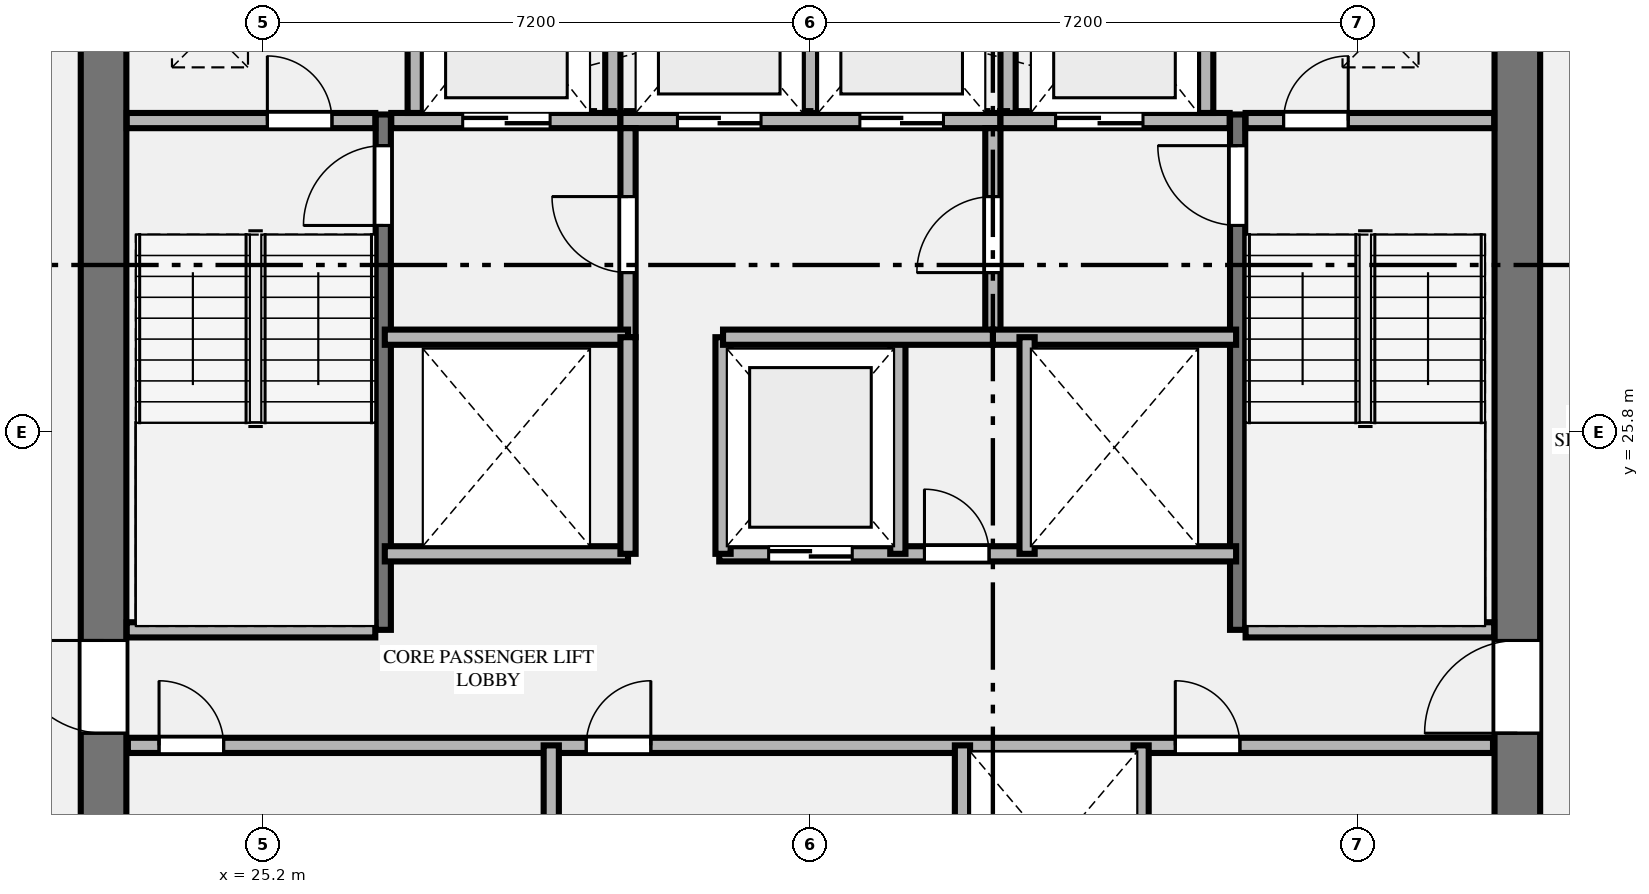
"""IFC4 building model, lengths in metres.
Left out: names, types, materials, properties, quantities, classifications, styles, units other than length and angle.
Written with IfcOpenShell. Run it as: python <this file> out.ifc"""

import sys

from ifc_helpers import new_model, si_unit, direction, frame, frame_2d, origin, place, context, subcontext, project, spatial, rectangle, extrude, element, fill, save


model = new_model("IFC4")
c1 = context("Model", 3, precision=1e-05, world=origin(), true_north=direction((0.0, 1.0)))
c2 = subcontext(c1, "Body", "Model", "MODEL_VIEW")
j1 = project(units=[si_unit("LENGTHUNIT", "METRE"), si_unit("PLANEANGLEUNIT", "RADIAN")], contexts=[c1])
p1 = place(None, origin())
s1 = spatial("IfcSite", under=j1, at=p1, CompositionType="ELEMENT")
p2 = place(p1, origin())
s2 = spatial("IfcBuilding", under=s1, at=p2, CompositionType="ELEMENT")
p3 = place(p2, frame((0.0, 0.0, 171.9)))
s3 = spatial("IfcBuildingStorey", under=s2, at=p3, CompositionType="ELEMENT", Elevation=171.9)
p4 = place(p3, frame((23.1, 18.925, 0.0), z_axis=(0.0, 0.0, 1.0), x_axis=(0.0, 1.0, 0.0)))
e1 = element("IfcWall", 1, at=p4, inside=s3, PredefinedType="SHEAR", context=c2, shape_type="SweptSolid", body=[
    extrude(rectangle(XDim=13.95, YDim=0.6, at=frame_2d((6.975, 0.0))), origin(), (0.0, 0.0, 1.0), 3.35),
])
p5 = place(p4, frame((2.915, 0.0, 0.0)))
e2 = element("IfcOpeningElement", 2, at=p5, cuts=e1, PredefinedType="OPENING", context=c2, shape_type="SweptSolid", body=[
    extrude(rectangle(XDim=1.22, YDim=2.25, at=frame_2d((0.61, 1.125))), frame((0.0, 0.31, 0.0), z_axis=(0.0, -1.0, 0.0), x_axis=(1.0, 0.0, 0.0)), (0.0, 0.0, 1.0), 0.62),
])
p6 = place(p3, frame((41.7, 18.925, 0.0), z_axis=(0.0, 0.0, 1.0), x_axis=(0.0, 1.0, 0.0)))
e3 = element("IfcWall", 3, at=p6, inside=s3, PredefinedType="SHEAR", context=c2, shape_type="SweptSolid", body=[
    extrude(rectangle(XDim=13.95, YDim=0.6, at=frame_2d((6.975, 0.0))), origin(), (0.0, 0.0, 1.0), 3.35),
])
p7 = place(p6, frame((2.915, 0.0, 0.0)))
e4 = element("IfcOpeningElement", 4, at=p7, cuts=e3, PredefinedType="OPENING", context=c2, shape_type="SweptSolid", body=[
    extrude(rectangle(XDim=1.22, YDim=2.25, at=frame_2d((0.61, 1.125))), frame((0.0, 0.31, 0.0), z_axis=(0.0, -1.0, 0.0), x_axis=(1.0, 0.0, 0.0)), (0.0, 0.0, 1.0), 0.62),
])
p8 = place(p3, frame((26.78, 23.2, 0.0), z_axis=(0.0, 0.0, 1.0), x_axis=(0.0, 1.0, 0.0)))
e5 = element("IfcWall", 5, at=p8, inside=s3, PredefinedType="SHEAR", context=c2, shape_type="SweptSolid", body=[
    extrude(rectangle(XDim=6.78, YDim=0.2, at=frame_2d((3.39, 0.0))), origin(), (0.0, 0.0, 1.0), 3.55),
])
p9 = place(p8, frame((5.32, 0.0, 0.0)))
e6 = element("IfcOpeningElement", 6, at=p9, cuts=e5, PredefinedType="OPENING", context=c2, shape_type="SweptSolid", body=[
    extrude(rectangle(XDim=1.05, YDim=2.15, at=frame_2d((0.525, 1.075))), frame((0.0, 0.11, 0.0), z_axis=(0.0, -1.0, 0.0), x_axis=(1.0, 0.0, 0.0)), (0.0, 0.0, 1.0), 0.22),
])
p10 = place(p3, frame((23.405, 23.2, 0.0), z_axis=(0.0, 0.0, 1.0), x_axis=(1.0, 0.0, 0.0)))
e7 = element("IfcWall", 7, at=p10, inside=s3, PredefinedType="PLUMBINGWALL", context=c2, shape_type="SweptSolid", body=[
    extrude(rectangle(XDim=3.27, YDim=0.2, at=frame_2d((1.635, 0.0))), origin(), (0.0, 0.0, 1.0), 3.35),
])
p11 = place(p3, frame((38.02, 23.2, 0.0), z_axis=(0.0, 0.0, 1.0), x_axis=(0.0, 1.0, 0.0)))
e8 = element("IfcWall", 8, at=p11, inside=s3, PredefinedType="SHEAR", context=c2, shape_type="SweptSolid", body=[
    extrude(rectangle(XDim=6.78, YDim=0.2, at=frame_2d((3.39, 0.0))), origin(), (0.0, 0.0, 1.0), 3.55),
])
p12 = place(p11, frame((5.32, 0.0, 0.0)))
e9 = element("IfcOpeningElement", 9, at=p12, cuts=e8, PredefinedType="OPENING", context=c2, shape_type="SweptSolid", body=[
    extrude(rectangle(XDim=1.05, YDim=2.15, at=frame_2d((0.525, 1.075))), frame((0.0, 0.11, 0.0), z_axis=(0.0, -1.0, 0.0), x_axis=(1.0, 0.0, 0.0)), (0.0, 0.0, 1.0), 0.22),
])
p13 = place(p3, frame((38.125, 23.2, 0.0), z_axis=(0.0, 0.0, 1.0), x_axis=(1.0, 0.0, 0.0)))
e10 = element("IfcWall", 10, at=p13, inside=s3, PredefinedType="PLUMBINGWALL", context=c2, shape_type="SweptSolid", body=[
    extrude(rectangle(XDim=3.27, YDim=0.2, at=frame_2d((1.635, 0.0))), origin(), (0.0, 0.0, 1.0), 3.35),
])
p14 = place(p3, frame((23.405, 29.9, 0.0), z_axis=(0.0, 0.0, 1.0), x_axis=(1.0, 0.0, 0.0)))
e11 = element("IfcWall", 11, at=p14, inside=s3, PredefinedType="PLUMBINGWALL", context=c2, shape_type="SweptSolid", body=[
    extrude(rectangle(XDim=3.27, YDim=0.2, at=frame_2d((1.635, 0.0))), origin(), (0.0, 0.0, 1.0), 3.35),
])
p15 = place(p14, frame((1.85, 0.0, 0.0)))
e12 = element("IfcOpeningElement", 12, at=p15, cuts=e11, PredefinedType="OPENING", context=c2, shape_type="SweptSolid", body=[
    extrude(rectangle(XDim=0.85, YDim=2.05, at=frame_2d((0.425, 1.025))), frame((0.0, 0.11, 0.0), z_axis=(0.0, -1.0, 0.0), x_axis=(1.0, 0.0, 0.0)), (0.0, 0.0, 1.0), 0.22),
])
p16 = place(p3, frame((26.885, 29.9, 0.0), z_axis=(0.0, 0.0, 1.0), x_axis=(1.0, 0.0, 0.0)))
e13 = element("IfcWall", 13, at=p16, inside=s3, PredefinedType="PLUMBINGWALL", context=c2, shape_type="SweptSolid", body=[
    extrude(rectangle(XDim=3.015, YDim=0.2, at=frame_2d((1.507, 0.0))), origin(), (0.0, 0.0, 1.0), 3.35),
])
p17 = place(p16, frame((0.94, 0.0, 0.0)))
e14 = element("IfcOpeningElement", 14, at=p17, cuts=e13, PredefinedType="OPENING", context=c2, shape_type="SweptSolid", body=[
    extrude(rectangle(XDim=1.15, YDim=2.2, at=frame_2d((0.575, 1.1))), frame((0.0, 0.11, 0.0), z_axis=(0.0, -1.0, 0.0), x_axis=(1.0, 0.0, 0.0)), (0.0, 0.0, 1.0), 0.22),
])
p18 = place(p3, frame((29.9, 29.9, 0.0), z_axis=(0.0, 0.0, 1.0), x_axis=(1.0, 0.0, 0.0)))
e15 = element("IfcWall", 15, at=p18, inside=s3, PredefinedType="PLUMBINGWALL", context=c2, shape_type="SweptSolid", body=[
    extrude(rectangle(XDim=5.0, YDim=0.2, at=frame_2d((2.5, 0.0))), origin(), (0.0, 0.0, 1.0), 3.35),
])
p19 = place(p18, frame((0.75, 0.0, 0.0)))
e16 = element("IfcOpeningElement", 16, at=p19, cuts=e15, PredefinedType="OPENING", context=c2, shape_type="SweptSolid", body=[
    extrude(rectangle(XDim=1.1, YDim=2.2, at=frame_2d((0.55, 1.1))), frame((0.0, 0.11, 0.0), z_axis=(0.0, -1.0, 0.0), x_axis=(1.0, 0.0, 0.0)), (0.0, 0.0, 1.0), 0.22),
])
p20 = place(p18, frame((3.15, 0.0, 0.0)))
e17 = element("IfcOpeningElement", 17, at=p20, cuts=e15, PredefinedType="OPENING", context=c2, shape_type="SweptSolid", body=[
    extrude(rectangle(XDim=1.1, YDim=2.2, at=frame_2d((0.55, 1.1))), frame((0.0, 0.11, 0.0), z_axis=(0.0, -1.0, 0.0), x_axis=(1.0, 0.0, 0.0)), (0.0, 0.0, 1.0), 0.22),
])
p21 = place(p3, frame((34.9, 29.9, 0.0), z_axis=(0.0, 0.0, 1.0), x_axis=(1.0, 0.0, 0.0)))
e18 = element("IfcWall", 18, at=p21, inside=s3, PredefinedType="PLUMBINGWALL", context=c2, shape_type="SweptSolid", body=[
    extrude(rectangle(XDim=3.015, YDim=0.2, at=frame_2d((1.508, 0.0))), origin(), (0.0, 0.0, 1.0), 3.35),
])
p22 = place(p21, frame((0.725, 0.0, 0.0)))
e19 = element("IfcOpeningElement", 19, at=p22, cuts=e18, PredefinedType="OPENING", context=c2, shape_type="SweptSolid", body=[
    extrude(rectangle(XDim=1.15, YDim=2.2, at=frame_2d((0.575, 1.1))), frame((0.0, 0.11, 0.0), z_axis=(0.0, -1.0, 0.0), x_axis=(1.0, 0.0, 0.0)), (0.0, 0.0, 1.0), 0.22),
])
p23 = place(p3, frame((38.125, 29.9, 0.0), z_axis=(0.0, 0.0, 1.0), x_axis=(1.0, 0.0, 0.0)))
e20 = element("IfcWall", 20, at=p23, inside=s3, PredefinedType="PLUMBINGWALL", context=c2, shape_type="SweptSolid", body=[
    extrude(rectangle(XDim=3.27, YDim=0.2, at=frame_2d((1.635, 0.0))), origin(), (0.0, 0.0, 1.0), 3.35),
])
p24 = place(p23, frame((0.5, 0.0, 0.0)))
e21 = element("IfcOpeningElement", 21, at=p24, cuts=e20, PredefinedType="OPENING", context=c2, shape_type="SweptSolid", body=[
    extrude(rectangle(XDim=0.85, YDim=2.05, at=frame_2d((0.425, 1.025))), frame((0.0, 0.11, 0.0), z_axis=(0.0, -1.0, 0.0), x_axis=(1.0, 0.0, 0.0)), (0.0, 0.0, 1.0), 0.22),
])
for number, where, z_axis, x_axis in (
    (22, (27.2, 30.0, 0.0), (0.0, 0.0, 1.0), (0.0, 1.0, 0.0)),
    (23, (29.8, 30.0, 0.0), (0.0, 0.0, 1.0), (0.0, 1.0, 0.0)),
    (24, (32.4, 30.0, 0.0), (0.0, 0.0, 1.0), (0.0, 1.0, 0.0)),
    (25, (35.0, 30.0, 0.0), (0.0, 0.0, 1.0), (0.0, 1.0, 0.0)),
    (26, (37.6, 30.0, 0.0), (0.0, 0.0, 1.0), (0.0, 1.0, 0.0)),
):
    element("IfcWall", number, at=place(p3, frame(where, z_axis=z_axis, x_axis=x_axis)), inside=s3, PredefinedType="PLUMBINGWALL", context=c2, shape_type="SweptSolid", body=[
        extrude(rectangle(XDim=2.85, YDim=0.2, at=frame_2d((1.425, 0.0))), origin(), (0.0, 0.0, 1.0), 3.35),
    ])
p25 = place(p3, frame((30.0, 27.05, 0.0), z_axis=(0.0, 0.0, 1.0), x_axis=(0.0, 1.0, 0.0)))
e27 = element("IfcWall", 27, at=p25, inside=s3, PredefinedType="PLUMBINGWALL", context=c2, shape_type="SweptSolid", body=[
    extrude(rectangle(XDim=2.75, YDim=0.2, at=frame_2d((1.375, 0.0))), origin(), (0.0, 0.0, 1.0), 3.35),
])
p26 = place(p25, frame((0.85, 0.0, 0.0)))
e28 = element("IfcOpeningElement", 28, at=p26, cuts=e27, PredefinedType="OPENING", context=c2, shape_type="SweptSolid", body=[
    extrude(rectangle(XDim=1.0, YDim=2.15, at=frame_2d((0.5, 1.075))), frame((0.0, 0.11, 0.0), z_axis=(0.0, -1.0, 0.0), x_axis=(1.0, 0.0, 0.0)), (0.0, 0.0, 1.0), 0.22),
])
p27 = place(p3, frame((26.8, 27.05, 0.0), z_axis=(0.0, 0.0, 1.0), x_axis=(1.0, 0.0, 0.0)))
e29 = element("IfcWall", 29, at=p27, inside=s3, PredefinedType="PLUMBINGWALL", context=c2, shape_type="SweptSolid", body=[
    extrude(rectangle(XDim=3.2, YDim=0.2, at=frame_2d((1.6, 0.0))), origin(), (0.0, 0.0, 1.0), 3.35),
])
p28 = place(p3, frame((34.8, 27.05, 0.0), z_axis=(0.0, 0.0, 1.0), x_axis=(0.0, 1.0, 0.0)))
e30 = element("IfcWall", 30, at=p28, inside=s3, PredefinedType="PLUMBINGWALL", context=c2, shape_type="SweptSolid", body=[
    extrude(rectangle(XDim=2.75, YDim=0.2, at=frame_2d((1.375, 0.0))), origin(), (0.0, 0.0, 1.0), 3.35),
])
p29 = place(p28, frame((0.85, 0.0, 0.0)))
e31 = element("IfcOpeningElement", 31, at=p29, cuts=e30, PredefinedType="OPENING", context=c2, shape_type="SweptSolid", body=[
    extrude(rectangle(XDim=1.0, YDim=2.15, at=frame_2d((0.5, 1.075))), frame((0.0, 0.11, 0.0), z_axis=(0.0, -1.0, 0.0), x_axis=(1.0, 0.0, 0.0)), (0.0, 0.0, 1.0), 0.22),
])
for number, where, z_axis, x_axis in (
    (32, (34.8, 27.05, 0.0), (0.0, 0.0, 1.0), (1.0, 0.0, 0.0)),
    (33, (26.8, 24.2, 0.0), (0.0, 0.0, 1.0), (1.0, 0.0, 0.0)),
):
    element("IfcWall", number, at=place(p3, frame(where, z_axis=z_axis, x_axis=x_axis)), inside=s3, PredefinedType="PLUMBINGWALL", context=c2, shape_type="SweptSolid", body=[
        extrude(rectangle(XDim=3.2, YDim=0.2, at=frame_2d((1.6, 0.0))), origin(), (0.0, 0.0, 1.0), 3.35),
    ])
p30 = place(p3, frame((30.0, 24.2, 0.0), z_axis=(0.0, 0.0, 1.0), x_axis=(0.0, 1.0, 0.0)))
e34 = element("IfcWall", 34, at=p30, inside=s3, PredefinedType="PLUMBINGWALL", context=c2, shape_type="SweptSolid", body=[
    extrude(rectangle(XDim=2.85, YDim=0.2, at=frame_2d((1.425, 0.0))), origin(), (0.0, 0.0, 1.0), 3.35),
])
p31 = place(p3, frame((31.2, 24.2, 0.0), z_axis=(0.0, 0.0, 1.0), x_axis=(1.0, 0.0, 0.0)))
e35 = element("IfcWall", 35, at=p31, inside=s3, PredefinedType="PLUMBINGWALL", context=c2, shape_type="SweptSolid", body=[
    extrude(rectangle(XDim=6.8, YDim=0.2, at=frame_2d((3.4, 0.0))), origin(), (0.0, 0.0, 1.0), 3.35),
])
p32 = place(p31, frame((0.65, 0.0, 0.0)))
e36 = element("IfcOpeningElement", 36, at=p32, cuts=e35, PredefinedType="OPENING", context=c2, shape_type="SweptSolid", body=[
    extrude(rectangle(XDim=1.1, YDim=2.2, at=frame_2d((0.55, 1.1))), frame((0.0, 0.11, 0.0), z_axis=(0.0, -1.0, 0.0), x_axis=(1.0, 0.0, 0.0)), (0.0, 0.0, 1.0), 0.22),
])
p33 = place(p31, frame((2.7, 0.0, 0.0)))
e37 = element("IfcOpeningElement", 37, at=p33, cuts=e35, PredefinedType="OPENING", context=c2, shape_type="SweptSolid", body=[
    extrude(rectangle(XDim=0.85, YDim=2.05, at=frame_2d((0.425, 1.025))), frame((0.0, 0.11, 0.0), z_axis=(0.0, -1.0, 0.0), x_axis=(1.0, 0.0, 0.0)), (0.0, 0.0, 1.0), 0.22),
])
for number, where, z_axis, x_axis in (
    (38, (31.25, 24.2, 0.0), (0.0, 0.0, 1.0), (0.0, 1.0, 0.0)),
    (39, (33.55, 24.2, 0.0), (0.0, 0.0, 1.0), (0.0, 1.0, 0.0)),
    (40, (35.25, 24.2, 0.0), (0.0, 0.0, 1.0), (0.0, 1.0, 0.0)),
):
    element("IfcWall", number, at=place(p3, frame(where, z_axis=z_axis, x_axis=x_axis)), inside=s3, PredefinedType="PLUMBINGWALL", context=c2, shape_type="SweptSolid", body=[
        extrude(rectangle(XDim=2.85, YDim=0.2, at=frame_2d((1.425, 0.0))), origin(), (0.0, 0.0, 1.0), 3.35),
    ])
p34 = place(p3, frame((31.25, 27.05, 0.0), z_axis=(0.0, 0.0, 1.0), x_axis=(1.0, 0.0, 0.0)))
e41 = element("IfcWall", 41, at=p34, inside=s3, PredefinedType="PLUMBINGWALL", context=c2, shape_type="SweptSolid", body=[
    extrude(rectangle(XDim=3.55, YDim=0.2, at=frame_2d((1.775, 0.0))), origin(), (0.0, 0.0, 1.0), 3.35),
])
p35 = place(p3, frame((23.42, 21.68, 0.0), z_axis=(0.0, 0.0, 1.0), x_axis=(1.0, 0.0, 0.0)))
e42 = element("IfcWall", 42, at=p35, inside=s3, PredefinedType="PLUMBINGWALL", context=c2, shape_type="SweptSolid", body=[
    extrude(rectangle(XDim=17.96, YDim=0.2, at=frame_2d((8.98, 0.0))), origin(), (0.0, 0.0, 1.0), 3.35),
])
p36 = place(p35, frame((0.41, 0.0, 0.0)))
e43 = element("IfcOpeningElement", 43, at=p36, cuts=e42, PredefinedType="OPENING", context=c2, shape_type="SweptSolid", body=[
    extrude(rectangle(XDim=0.85, YDim=2.05, at=frame_2d((0.425, 1.025))), frame((0.0, 0.11, 0.0), z_axis=(0.0, -1.0, 0.0), x_axis=(1.0, 0.0, 0.0)), (0.0, 0.0, 1.0), 0.22),
])
p37 = place(p35, frame((6.03, 0.0, 0.0)))
e44 = element("IfcOpeningElement", 44, at=p37, cuts=e42, PredefinedType="OPENING", context=c2, shape_type="SweptSolid", body=[
    extrude(rectangle(XDim=0.85, YDim=2.05, at=frame_2d((0.425, 1.025))), frame((0.0, 0.11, 0.0), z_axis=(0.0, -1.0, 0.0), x_axis=(1.0, 0.0, 0.0)), (0.0, 0.0, 1.0), 0.22),
])
p38 = place(p35, frame((13.78, 0.0, 0.0)))
e45 = element("IfcOpeningElement", 45, at=p38, cuts=e42, PredefinedType="OPENING", context=c2, shape_type="SweptSolid", body=[
    extrude(rectangle(XDim=0.85, YDim=2.05, at=frame_2d((0.425, 1.025))), frame((0.0, 0.11, 0.0), z_axis=(0.0, -1.0, 0.0), x_axis=(1.0, 0.0, 0.0)), (0.0, 0.0, 1.0), 0.22),
])
for number, where, z_axis, x_axis in (
    (46, (34.4, 18.95, 0.0), (0.0, 0.0, 1.0), (0.0, 1.0, 0.0)),
    (47, (36.75, 18.95, 0.0), (0.0, 0.0, 1.0), (0.0, 1.0, 0.0)),
    (48, (28.99, 18.95, 0.0), (0.0, 0.0, 1.0), (0.0, 1.0, 0.0)),
):
    element("IfcWall", number, at=place(p3, frame(where, z_axis=z_axis, x_axis=x_axis)), inside=s3, PredefinedType="PLUMBINGWALL", context=c2, shape_type="SweptSolid", body=[
        extrude(rectangle(XDim=2.73, YDim=0.2, at=frame_2d((1.365, 0.0))), origin(), (0.0, 0.0, 1.0), 3.35),
    ])
p39 = place(p5, origin())
e49 = element("IfcDoor", 49, at=p39, inside=s3, OperationType="SINGLE_SWING_RIGHT", PredefinedType="DOOR", context=c2, shape_type="SweptSolid", body=[
    extrude(rectangle(XDim=1.22, YDim=2.25, at=frame_2d((0.61, 1.125))), frame((0.0, 0.025, 0.0), z_axis=(0.0, -1.0, 0.0), x_axis=(1.0, 0.0, 0.0)), (0.0, 0.0, 1.0), 0.05),
])
fill(e2, e49)
p40 = place(p7, origin())
e50 = element("IfcDoor", 50, at=p40, inside=s3, OperationType="SINGLE_SWING_LEFT", PredefinedType="DOOR", context=c2, shape_type="SweptSolid", body=[
    extrude(rectangle(XDim=1.22, YDim=2.25, at=frame_2d((0.61, 1.125))), frame((0.0, 0.025, 0.0), z_axis=(0.0, -1.0, 0.0), x_axis=(1.0, 0.0, 0.0)), (0.0, 0.0, 1.0), 0.05),
])
fill(e4, e50)
p41 = place(p9, origin())
e51 = element("IfcDoor", 51, at=p41, inside=s3, OperationType="SINGLE_SWING_LEFT", PredefinedType="DOOR", context=c2, shape_type="SweptSolid", body=[
    extrude(rectangle(XDim=1.05, YDim=2.15, at=frame_2d((0.525, 1.075))), frame((0.0, 0.025, 0.0), z_axis=(0.0, -1.0, 0.0), x_axis=(1.0, 0.0, 0.0)), (0.0, 0.0, 1.0), 0.05),
])
fill(e6, e51)
p42 = place(p12, origin())
e52 = element("IfcDoor", 52, at=p42, inside=s3, OperationType="SINGLE_SWING_RIGHT", PredefinedType="DOOR", context=c2, shape_type="SweptSolid", body=[
    extrude(rectangle(XDim=1.05, YDim=2.15, at=frame_2d((0.525, 1.075))), frame((0.0, 0.025, 0.0), z_axis=(0.0, -1.0, 0.0), x_axis=(1.0, 0.0, 0.0)), (0.0, 0.0, 1.0), 0.05),
])
fill(e9, e52)
p43 = place(p15, origin())
e53 = element("IfcDoor", 53, at=p43, inside=s3, OperationType="SINGLE_SWING_LEFT", PredefinedType="DOOR", context=c2, shape_type="SweptSolid", body=[
    extrude(rectangle(XDim=0.85, YDim=2.05, at=frame_2d((0.425, 1.025))), frame((0.0, 0.025, 0.0), z_axis=(0.0, -1.0, 0.0), x_axis=(1.0, 0.0, 0.0)), (0.0, 0.0, 1.0), 0.05),
])
fill(e12, e53)
p44 = place(p24, origin())
e54 = element("IfcDoor", 54, at=p44, inside=s3, OperationType="SINGLE_SWING_RIGHT", PredefinedType="DOOR", context=c2, shape_type="SweptSolid", body=[
    extrude(rectangle(XDim=0.85, YDim=2.05, at=frame_2d((0.425, 1.025))), frame((0.0, 0.025, 0.0), z_axis=(0.0, -1.0, 0.0), x_axis=(1.0, 0.0, 0.0)), (0.0, 0.0, 1.0), 0.05),
])
fill(e21, e54)
p45 = place(p17, origin())
e55 = element("IfcDoor", 55, at=p45, inside=s3, OperationType="DOUBLE_DOOR_SLIDING", PredefinedType="DOOR", context=c2, shape_type="SweptSolid", body=[
    extrude(rectangle(XDim=1.15, YDim=2.2, at=frame_2d((0.575, 1.1))), frame((0.0, 0.025, 0.0), z_axis=(0.0, -1.0, 0.0), x_axis=(1.0, 0.0, 0.0)), (0.0, 0.0, 1.0), 0.05),
])
fill(e14, e55)
p46 = place(p22, origin())
e56 = element("IfcDoor", 56, at=p46, inside=s3, OperationType="DOUBLE_DOOR_SLIDING", PredefinedType="DOOR", context=c2, shape_type="SweptSolid", body=[
    extrude(rectangle(XDim=1.15, YDim=2.2, at=frame_2d((0.575, 1.1))), frame((0.0, 0.025, 0.0), z_axis=(0.0, -1.0, 0.0), x_axis=(1.0, 0.0, 0.0)), (0.0, 0.0, 1.0), 0.05),
])
fill(e19, e56)
p47 = place(p19, origin())
e57 = element("IfcDoor", 57, at=p47, inside=s3, OperationType="DOUBLE_DOOR_SLIDING", PredefinedType="DOOR", context=c2, shape_type="SweptSolid", body=[
    extrude(rectangle(XDim=1.1, YDim=2.2, at=frame_2d((0.55, 1.1))), frame((0.0, 0.025, 0.0), z_axis=(0.0, -1.0, 0.0), x_axis=(1.0, 0.0, 0.0)), (0.0, 0.0, 1.0), 0.05),
])
fill(e16, e57)
p48 = place(p20, origin())
e58 = element("IfcDoor", 58, at=p48, inside=s3, OperationType="DOUBLE_DOOR_SLIDING", PredefinedType="DOOR", context=c2, shape_type="SweptSolid", body=[
    extrude(rectangle(XDim=1.1, YDim=2.2, at=frame_2d((0.55, 1.1))), frame((0.0, 0.025, 0.0), z_axis=(0.0, -1.0, 0.0), x_axis=(1.0, 0.0, 0.0)), (0.0, 0.0, 1.0), 0.05),
])
fill(e17, e58)
p49 = place(p26, origin())
e59 = element("IfcDoor", 59, at=p49, inside=s3, OperationType="SINGLE_SWING_RIGHT", PredefinedType="DOOR", context=c2, shape_type="SweptSolid", body=[
    extrude(rectangle(XDim=1.0, YDim=2.15, at=frame_2d((0.5, 1.075))), frame((0.0, 0.025, 0.0), z_axis=(0.0, -1.0, 0.0), x_axis=(1.0, 0.0, 0.0)), (0.0, 0.0, 1.0), 0.05),
])
fill(e28, e59)
p50 = place(p29, origin())
e60 = element("IfcDoor", 60, at=p50, inside=s3, OperationType="SINGLE_SWING_LEFT", PredefinedType="DOOR", context=c2, shape_type="SweptSolid", body=[
    extrude(rectangle(XDim=1.0, YDim=2.15, at=frame_2d((0.5, 1.075))), frame((0.0, 0.025, 0.0), z_axis=(0.0, -1.0, 0.0), x_axis=(1.0, 0.0, 0.0)), (0.0, 0.0, 1.0), 0.05),
])
fill(e31, e60)
p51 = place(p32, origin())
e61 = element("IfcDoor", 61, at=p51, inside=s3, OperationType="DOUBLE_DOOR_SLIDING", PredefinedType="DOOR", context=c2, shape_type="SweptSolid", body=[
    extrude(rectangle(XDim=1.1, YDim=2.2, at=frame_2d((0.55, 1.1))), frame((0.0, 0.025, 0.0), z_axis=(0.0, -1.0, 0.0), x_axis=(1.0, 0.0, 0.0)), (0.0, 0.0, 1.0), 0.05),
])
fill(e36, e61)
p52 = place(p33, origin())
e62 = element("IfcDoor", 62, at=p52, inside=s3, OperationType="SINGLE_SWING_LEFT", PredefinedType="DOOR", context=c2, shape_type="SweptSolid", body=[
    extrude(rectangle(XDim=0.85, YDim=2.05, at=frame_2d((0.425, 1.025))), frame((0.0, 0.025, 0.0), z_axis=(0.0, -1.0, 0.0), x_axis=(1.0, 0.0, 0.0)), (0.0, 0.0, 1.0), 0.05),
])
fill(e37, e62)
p53 = place(p36, origin())
e63 = element("IfcDoor", 63, at=p53, inside=s3, OperationType="SINGLE_SWING_LEFT", PredefinedType="DOOR", context=c2, shape_type="SweptSolid", body=[
    extrude(rectangle(XDim=0.85, YDim=2.05, at=frame_2d((0.425, 1.025))), frame((0.0, 0.025, 0.0), z_axis=(0.0, -1.0, 0.0), x_axis=(1.0, 0.0, 0.0)), (0.0, 0.0, 1.0), 0.05),
])
fill(e43, e63)
p54 = place(p37, origin())
e64 = element("IfcDoor", 64, at=p54, inside=s3, OperationType="SINGLE_SWING_RIGHT", PredefinedType="DOOR", context=c2, shape_type="SweptSolid", body=[
    extrude(rectangle(XDim=0.85, YDim=2.05, at=frame_2d((0.425, 1.025))), frame((0.0, 0.025, 0.0), z_axis=(0.0, -1.0, 0.0), x_axis=(1.0, 0.0, 0.0)), (0.0, 0.0, 1.0), 0.05),
])
fill(e44, e64)
p55 = place(p38, origin())
e65 = element("IfcDoor", 65, at=p55, inside=s3, OperationType="SINGLE_SWING_LEFT", PredefinedType="DOOR", context=c2, shape_type="SweptSolid", body=[
    extrude(rectangle(XDim=0.85, YDim=2.05, at=frame_2d((0.425, 1.025))), frame((0.0, 0.025, 0.0), z_axis=(0.0, -1.0, 0.0), x_axis=(1.0, 0.0, 0.0)), (0.0, 0.0, 1.0), 0.05),
])
fill(e45, e65)
save(model, sys.argv[1])
